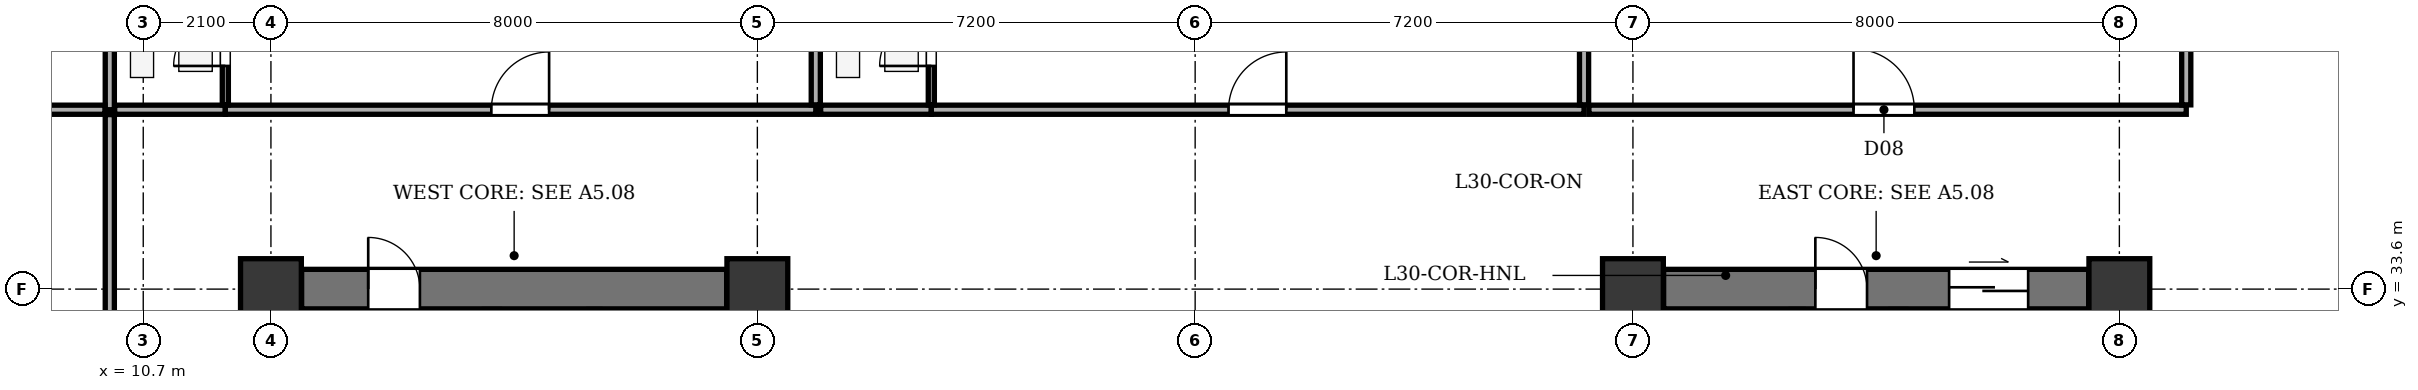
"""IFC4 building model, lengths in metres.
Left out: names, types, materials, properties, quantities, classifications, styles, units other than length and angle.
Written with IfcOpenShell. Run it as: python <this file> out.ifc"""

import sys

from ifc_helpers import new_model, si_unit, direction, frame, frame_2d, origin, origin_2d, place, context, subcontext, project, spatial, rectangle, extrude, element, fill, save


model = new_model("IFC4")
c1 = context("Model", 3, precision=1e-05, world=origin(), true_north=direction((0.0, 1.0)))
c2 = subcontext(c1, "Body", "Model", "MODEL_VIEW")
j1 = project(units=[si_unit("LENGTHUNIT", "METRE"), si_unit("PLANEANGLEUNIT", "RADIAN")], contexts=[c1])
p1 = place(None, origin())
s1 = spatial("IfcSite", under=j1, at=p1, CompositionType="ELEMENT")
p2 = place(p1, origin())
s2 = spatial("IfcBuilding", under=s1, at=p2, CompositionType="ELEMENT")
p3 = place(p2, frame((0.0, 0.0, 123.8)))
s3 = spatial("IfcBuildingStorey", under=s2, at=p3, CompositionType="ELEMENT", Elevation=123.8)
for number, where, z_axis, x_axis in (
    (1, (12.8, 33.6, 0.0), (0.0, 0.0, 1.0), (1.0, 0.0, 0.0)),
    (2, (20.8, 33.6, 0.0), (0.0, 0.0, 1.0), (1.0, 0.0, 0.0)),
    (3, (35.2, 33.6, 0.0), (0.0, 0.0, 1.0), (1.0, 0.0, 0.0)),
    (4, (43.2, 33.6, 0.0), (0.0, 0.0, 1.0), (1.0, 0.0, 0.0)),
):
    element("IfcColumn", number, at=place(p3, frame(where, z_axis=z_axis, x_axis=x_axis)), inside=s3, PredefinedType="COLUMN", context=c2, shape_type="SweptSolid", body=[
        extrude(rectangle(XDim=1.0, YDim=1.0, at=origin_2d()), origin(), (0.0, 0.0, 1.0), 3.5),
    ])
p4 = place(p3, frame((13.305, 33.6, 0.0), z_axis=(0.0, 0.0, 1.0), x_axis=(1.0, 0.0, 0.0)))
e5 = element("IfcWall", 5, at=p4, inside=s3, PredefinedType="SHEAR", context=c2, shape_type="SweptSolid", body=[
    extrude(rectangle(XDim=6.99, YDim=0.65, at=frame_2d((3.495, 0.0))), origin(), (0.0, 0.0, 1.0), 3.2),
])
p5 = place(p4, frame((1.095, 0.0, 0.0)))
e6 = element("IfcOpeningElement", 6, at=p5, cuts=e5, PredefinedType="OPENING", context=c2, shape_type="SweptSolid", body=[
    extrude(rectangle(XDim=0.85, YDim=2.02, at=frame_2d((0.425, 1.01))), frame((0.0, 0.335, 0.0), z_axis=(0.0, -1.0, 0.0), x_axis=(1.0, 0.0, 0.0)), (0.0, 0.0, 1.0), 0.67),
])
p6 = place(p3, frame((16.435, 21.135, 0.0), z_axis=(0.0, 0.0, 1.0), x_axis=(0.0, 1.0, 0.0)))
e7 = element("IfcWall", 7, at=p6, inside=s3, PredefinedType="SHEAR", context=c2, shape_type="SweptSolid", body=[
    extrude(rectangle(XDim=12.13, YDim=0.25, at=frame_2d((6.065, 0.0))), origin(), (0.0, 0.0, 1.0), 3.2),
])
p7 = place(p6, frame((0.515, 0.0, 0.0)))
e8 = element("IfcOpeningElement", 8, at=p7, cuts=e7, PredefinedType="OPENING", context=c2, shape_type="SweptSolid", body=[
    extrude(rectangle(XDim=1.2, YDim=2.15, at=frame_2d((0.6, 1.075))), frame((0.0, 0.135, 0.0), z_axis=(0.0, -1.0, 0.0), x_axis=(1.0, 0.0, 0.0)), (0.0, 0.0, 1.0), 0.27),
])
p8 = place(p6, frame((2.665, 0.0, 0.0)))
e9 = element("IfcOpeningElement", 9, at=p8, cuts=e7, PredefinedType="OPENING", context=c2, shape_type="SweptSolid", body=[
    extrude(rectangle(XDim=1.15, YDim=2.15, at=frame_2d((0.575, 1.075))), frame((0.0, 0.135, 0.0), z_axis=(0.0, -1.0, 0.0), x_axis=(1.0, 0.0, 0.0)), (0.0, 0.0, 1.0), 0.27),
])
p9 = place(p3, frame((18.12, 31.17, 0.0), z_axis=(0.0, 0.0, 1.0), x_axis=(0.0, 1.0, 0.0)))
e10 = element("IfcWall", 10, at=p9, inside=s3, PredefinedType="PARTITIONING", context=c2, shape_type="SweptSolid", body=[
    extrude(rectangle(XDim=2.095, YDim=0.18, at=frame_2d((1.047, 0.0))), origin(), (0.0, 0.0, 1.0), 3.2),
])
p10 = place(p3, frame((35.705, 33.6, 0.0), z_axis=(0.0, 0.0, 1.0), x_axis=(1.0, 0.0, 0.0)))
e11 = element("IfcWall", 11, at=p10, inside=s3, PredefinedType="SHEAR", context=c2, shape_type="SweptSolid", body=[
    extrude(rectangle(XDim=6.99, YDim=0.65, at=frame_2d((3.495, 0.0))), origin(), (0.0, 0.0, 1.0), 3.2),
])
p11 = place(p10, frame((4.695, 0.0, 0.0)))
e12 = element("IfcOpeningElement", 12, at=p11, cuts=e11, PredefinedType="OPENING", context=c2, shape_type="SweptSolid", body=[
    extrude(rectangle(XDim=1.3, YDim=2.15, at=frame_2d((0.65, 1.075))), frame((0.0, 0.335, 0.0), z_axis=(0.0, -1.0, 0.0), x_axis=(1.0, 0.0, 0.0)), (0.0, 0.0, 1.0), 0.67),
])
p12 = place(p10, frame((2.495, 0.0, 0.0)))
e13 = element("IfcOpeningElement", 13, at=p12, cuts=e11, PredefinedType="OPENING", context=c2, shape_type="SweptSolid", body=[
    extrude(rectangle(XDim=0.85, YDim=2.02, at=frame_2d((0.425, 1.01))), frame((0.0, 0.335, 0.0), z_axis=(0.0, -1.0, 0.0), x_axis=(1.0, 0.0, 0.0)), (0.0, 0.0, 1.0), 0.67),
])
p13 = place(p3, frame((39.565, 21.135, 0.0), z_axis=(0.0, 0.0, 1.0), x_axis=(0.0, 1.0, 0.0)))
e14 = element("IfcWall", 14, at=p13, inside=s3, PredefinedType="SHEAR", context=c2, shape_type="SweptSolid", body=[
    extrude(rectangle(XDim=12.13, YDim=0.25, at=frame_2d((6.065, 0.0))), origin(), (0.0, 0.0, 1.0), 3.2),
])
p14 = place(p13, frame((0.515, 0.0, 0.0)))
e15 = element("IfcOpeningElement", 15, at=p14, cuts=e14, PredefinedType="OPENING", context=c2, shape_type="SweptSolid", body=[
    extrude(rectangle(XDim=1.2, YDim=2.15, at=frame_2d((0.6, 1.075))), frame((0.0, 0.135, 0.0), z_axis=(0.0, -1.0, 0.0), x_axis=(1.0, 0.0, 0.0)), (0.0, 0.0, 1.0), 0.27),
])
p15 = place(p13, frame((2.665, 0.0, 0.0)))
e16 = element("IfcOpeningElement", 16, at=p15, cuts=e14, PredefinedType="OPENING", context=c2, shape_type="SweptSolid", body=[
    extrude(rectangle(XDim=1.15, YDim=2.15, at=frame_2d((0.575, 1.075))), frame((0.0, 0.135, 0.0), z_axis=(0.0, -1.0, 0.0), x_axis=(1.0, 0.0, 0.0)), (0.0, 0.0, 1.0), 0.27),
])
p16 = place(p3, frame((37.9, 25.27, 0.0), z_axis=(0.0, 0.0, 1.0), x_axis=(0.0, 1.0, 0.0)))
e17 = element("IfcWall", 17, at=p16, inside=s3, PredefinedType="SOLIDWALL", context=c2, shape_type="SweptSolid", body=[
    extrude(rectangle(XDim=7.995, YDim=0.2, at=frame_2d((3.998, 0.0))), origin(), (0.0, 0.0, 1.0), 3.2),
])
p17 = place(p3, frame((10.15, 36.55, 0.0), z_axis=(0.0, 0.0, 1.0), x_axis=(0.0, 1.0, 0.0)))
e18 = element("IfcWall", 18, at=p17, inside=s3, PredefinedType="PARTITIONING", context=c2, shape_type="SweptSolid", body=[
    extrude(rectangle(XDim=9.575, YDim=0.15, at=frame_2d((4.788, 0.0))), origin(), (0.0, 0.0, 1.0), 3.2),
])
p18 = place(p3, frame((10.23, 36.55, 0.0), z_axis=(0.0, 0.0, 1.0), x_axis=(1.0, 0.0, 0.0)))
e19 = element("IfcWall", 19, at=p18, inside=s3, PredefinedType="PARTITIONING", context=c2, shape_type="SweptSolid", body=[
    extrude(rectangle(XDim=1.82, YDim=0.15, at=frame_2d((0.91, 0.0))), origin(), (0.0, 0.0, 1.0), 3.2),
])
p19 = place(p3, frame((12.05, 36.55, 0.0), z_axis=(0.0, 0.0, 1.0), x_axis=(1.0, 0.0, 0.0)))
e20 = element("IfcWall", 20, at=p19, inside=s3, PredefinedType="PARTITIONING", context=c2, shape_type="SweptSolid", body=[
    extrude(rectangle(XDim=9.711, YDim=0.15, at=frame_2d((4.855, 0.0))), origin(), (0.0, 0.0, 1.0), 3.2),
])
p20 = place(p19, frame((4.375, 0.0, 0.0)))
e21 = element("IfcOpeningElement", 21, at=p20, cuts=e20, PredefinedType="OPENING", context=c2, shape_type="SweptSolid", body=[
    extrude(rectangle(XDim=0.95, YDim=2.1, at=frame_2d((0.475, 1.05))), frame((0.0, 0.085, 0.0), z_axis=(0.0, -1.0, 0.0), x_axis=(1.0, 0.0, 0.0)), (0.0, 0.0, 1.0), 0.17),
])
p21 = place(p3, frame((12.05, 36.63, 0.0), z_axis=(0.0, 0.0, 1.0), x_axis=(0.0, 1.0, 0.0)))
e22 = element("IfcWall", 22, at=p21, inside=s3, PredefinedType="PARTITIONING", context=c2, shape_type="SweptSolid", body=[
    extrude(rectangle(XDim=2.25, YDim=0.1, at=frame_2d((1.125, 0.0))), origin(), (0.0, 0.0, 1.0), 3.2),
])
p22 = place(p21, frame((0.64, 0.0, 0.0)))
e23 = element("IfcOpeningElement", 23, at=p22, cuts=e22, PredefinedType="OPENING", context=c2, shape_type="SweptSolid", body=[
    extrude(rectangle(XDim=0.85, YDim=2.05, at=frame_2d((0.425, 1.025))), frame((0.0, 0.06, 0.0), z_axis=(0.0, -1.0, 0.0), x_axis=(1.0, 0.0, 0.0)), (0.0, 0.0, 1.0), 0.12),
])
p23 = place(p3, frame((21.761, 36.63, 0.0), z_axis=(0.0, 0.0, 1.0), x_axis=(0.0, 1.0, 0.0)))
e24 = element("IfcWall", 24, at=p23, inside=s3, PredefinedType="PARTITIONING", context=c2, shape_type="SweptSolid", body=[
    extrude(rectangle(XDim=9.495, YDim=0.15, at=frame_2d((4.748, 0.0))), origin(), (0.0, 0.0, 1.0), 3.2),
])
p24 = place(p3, frame((21.841, 36.55, 0.0), z_axis=(0.0, 0.0, 1.0), x_axis=(1.0, 0.0, 0.0)))
e25 = element("IfcWall", 25, at=p24, inside=s3, PredefinedType="PARTITIONING", context=c2, shape_type="SweptSolid", body=[
    extrude(rectangle(XDim=1.82, YDim=0.15, at=frame_2d((0.91, 0.0))), origin(), (0.0, 0.0, 1.0), 3.2),
])
p25 = place(p3, frame((23.661, 36.55, 0.0), z_axis=(0.0, 0.0, 1.0), x_axis=(1.0, 0.0, 0.0)))
e26 = element("IfcWall", 26, at=p25, inside=s3, PredefinedType="PARTITIONING", context=c2, shape_type="SweptSolid", body=[
    extrude(rectangle(XDim=10.735, YDim=0.15, at=frame_2d((5.368, 0.0))), origin(), (0.0, 0.0, 1.0), 3.2),
])
p26 = place(p25, frame((4.888, 0.0, 0.0)))
e27 = element("IfcOpeningElement", 27, at=p26, cuts=e26, PredefinedType="OPENING", context=c2, shape_type="SweptSolid", body=[
    extrude(rectangle(XDim=0.95, YDim=2.1, at=frame_2d((0.475, 1.05))), frame((0.0, 0.085, 0.0), z_axis=(0.0, -1.0, 0.0), x_axis=(1.0, 0.0, 0.0)), (0.0, 0.0, 1.0), 0.17),
])
p27 = place(p3, frame((23.661, 36.63, 0.0), z_axis=(0.0, 0.0, 1.0), x_axis=(0.0, 1.0, 0.0)))
e28 = element("IfcWall", 28, at=p27, inside=s3, PredefinedType="PARTITIONING", context=c2, shape_type="SweptSolid", body=[
    extrude(rectangle(XDim=2.25, YDim=0.1, at=frame_2d((1.125, 0.0))), origin(), (0.0, 0.0, 1.0), 3.2),
])
p28 = place(p27, frame((0.64, 0.0, 0.0)))
e29 = element("IfcOpeningElement", 29, at=p28, cuts=e28, PredefinedType="OPENING", context=c2, shape_type="SweptSolid", body=[
    extrude(rectangle(XDim=0.85, YDim=2.05, at=frame_2d((0.425, 1.025))), frame((0.0, 0.06, 0.0), z_axis=(0.0, -1.0, 0.0), x_axis=(1.0, 0.0, 0.0)), (0.0, 0.0, 1.0), 0.12),
])
p29 = place(p3, frame((34.396, 36.63, 0.0), z_axis=(0.0, 0.0, 1.0), x_axis=(0.0, 1.0, 0.0)))
e30 = element("IfcWall", 30, at=p29, inside=s3, PredefinedType="PARTITIONING", context=c2, shape_type="SweptSolid", body=[
    extrude(rectangle(XDim=9.495, YDim=0.15, at=frame_2d((4.748, 0.0))), origin(), (0.0, 0.0, 1.0), 3.2),
])
p30 = place(p3, frame((34.476, 36.55, 0.0), z_axis=(0.0, 0.0, 1.0), x_axis=(1.0, 0.0, 0.0)))
e31 = element("IfcWall", 31, at=p30, inside=s3, PredefinedType="PARTITIONING", context=c2, shape_type="SweptSolid", body=[
    extrude(rectangle(XDim=9.824, YDim=0.15, at=frame_2d((4.912, 0.0))), origin(), (0.0, 0.0, 1.0), 3.2),
])
p31 = place(p30, frame((4.352, 0.0, 0.0)))
e32 = element("IfcOpeningElement", 32, at=p31, cuts=e31, PredefinedType="OPENING", context=c2, shape_type="SweptSolid", body=[
    extrude(rectangle(XDim=1.0, YDim=2.1, at=frame_2d((0.5, 1.05))), frame((0.0, 0.085, 0.0), z_axis=(0.0, -1.0, 0.0), x_axis=(1.0, 0.0, 0.0)), (0.0, 0.0, 1.0), 0.17),
])
p32 = place(p3, frame((44.3, 36.63, 0.0), z_axis=(0.0, 0.0, 1.0), x_axis=(0.0, 1.0, 0.0)))
e33 = element("IfcWall", 33, at=p32, inside=s3, PredefinedType="PARTITIONING", context=c2, shape_type="SweptSolid", body=[
    extrude(rectangle(XDim=9.495, YDim=0.15, at=frame_2d((4.748, 0.0))), origin(), (0.0, 0.0, 1.0), 3.2),
])
p33 = place(p3, frame((4.675, 36.55, 0.0), z_axis=(0.0, 0.0, 1.0), x_axis=(1.0, 0.0, 0.0)))
e34 = element("IfcWall", 34, at=p33, inside=s3, PredefinedType="PARTITIONING", context=c2, shape_type="SweptSolid", body=[
    extrude(rectangle(XDim=5.395, YDim=0.15, at=frame_2d((2.698, 0.0))), origin(), (0.0, 0.0, 1.0), 3.2),
])
p34 = place(p3, frame((10.15, 17.93, 0.0), z_axis=(0.0, 0.0, 1.0), x_axis=(0.0, 1.0, 0.0)))
e35 = element("IfcWall", 35, at=p34, inside=s3, PredefinedType="PARTITIONING", context=c2, shape_type="SweptSolid", body=[
    extrude(rectangle(XDim=18.54, YDim=0.15, at=frame_2d((9.27, 0.0))), origin(), (0.0, 0.0, 1.0), 3.2),
])
p35 = place(p34, frame((8.79, 0.0, 0.0)))
e36 = element("IfcOpeningElement", 36, at=p35, cuts=e35, PredefinedType="OPENING", context=c2, shape_type="SweptSolid", body=[
    extrude(rectangle(XDim=0.95, YDim=2.1, at=frame_2d((0.475, 1.05))), frame((0.0, 0.085, 0.0), z_axis=(0.0, -1.0, 0.0), x_axis=(1.0, 0.0, 0.0)), (0.0, 0.0, 1.0), 0.17),
])
p36 = place(p5, origin())
e37 = element("IfcDoor", 37, at=p36, inside=s3, OperationType="SINGLE_SWING_LEFT", PredefinedType="DOOR", context=c2, shape_type="SweptSolid", body=[
    extrude(rectangle(XDim=0.85, YDim=2.02, at=frame_2d((0.425, 1.01))), frame((0.0, 0.025, 0.0), z_axis=(0.0, -1.0, 0.0), x_axis=(1.0, 0.0, 0.0)), (0.0, 0.0, 1.0), 0.05),
])
fill(e6, e37)
p37 = place(p11, origin())
e38 = element("IfcDoor", 38, at=p37, inside=s3, OperationType="DOUBLE_DOOR_SLIDING", PredefinedType="DOOR", context=c2, shape_type="SweptSolid", body=[
    extrude(rectangle(XDim=1.3, YDim=2.15, at=frame_2d((0.65, 1.075))), frame((0.0, 0.025, 0.0), z_axis=(0.0, -1.0, 0.0), x_axis=(1.0, 0.0, 0.0)), (0.0, 0.0, 1.0), 0.05),
])
fill(e12, e38)
p38 = place(p12, origin())
e39 = element("IfcDoor", 39, at=p38, inside=s3, OperationType="SINGLE_SWING_LEFT", PredefinedType="DOOR", context=c2, shape_type="SweptSolid", body=[
    extrude(rectangle(XDim=0.85, YDim=2.02, at=frame_2d((0.425, 1.01))), frame((0.0, 0.025, 0.0), z_axis=(0.0, -1.0, 0.0), x_axis=(1.0, 0.0, 0.0)), (0.0, 0.0, 1.0), 0.05),
])
fill(e13, e39)
p39 = place(p22, origin())
e40 = element("IfcDoor", 40, at=p39, inside=s3, OperationType="SINGLE_SWING_LEFT", PredefinedType="DOOR", context=c2, shape_type="SweptSolid", body=[
    extrude(rectangle(XDim=0.85, YDim=2.05, at=frame_2d((0.425, 1.025))), frame((0.0, 0.025, 0.0), z_axis=(0.0, -1.0, 0.0), x_axis=(1.0, 0.0, 0.0)), (0.0, 0.0, 1.0), 0.05),
])
fill(e23, e40)
p40 = place(p20, origin())
e41 = element("IfcDoor", 41, at=p40, inside=s3, OperationType="SINGLE_SWING_RIGHT", PredefinedType="DOOR", context=c2, shape_type="SweptSolid", body=[
    extrude(rectangle(XDim=0.95, YDim=2.1, at=frame_2d((0.475, 1.05))), frame((0.0, 0.025, 0.0), z_axis=(0.0, -1.0, 0.0), x_axis=(1.0, 0.0, 0.0)), (0.0, 0.0, 1.0), 0.05),
])
fill(e21, e41)
p41 = place(p28, origin())
e42 = element("IfcDoor", 42, at=p41, inside=s3, OperationType="SINGLE_SWING_LEFT", PredefinedType="DOOR", context=c2, shape_type="SweptSolid", body=[
    extrude(rectangle(XDim=0.85, YDim=2.05, at=frame_2d((0.425, 1.025))), frame((0.0, 0.025, 0.0), z_axis=(0.0, -1.0, 0.0), x_axis=(1.0, 0.0, 0.0)), (0.0, 0.0, 1.0), 0.05),
])
fill(e29, e42)
p42 = place(p26, origin())
e43 = element("IfcDoor", 43, at=p42, inside=s3, OperationType="SINGLE_SWING_RIGHT", PredefinedType="DOOR", context=c2, shape_type="SweptSolid", body=[
    extrude(rectangle(XDim=0.95, YDim=2.1, at=frame_2d((0.475, 1.05))), frame((0.0, 0.025, 0.0), z_axis=(0.0, -1.0, 0.0), x_axis=(1.0, 0.0, 0.0)), (0.0, 0.0, 1.0), 0.05),
])
fill(e27, e43)
p43 = place(p31, origin())
e44 = element("IfcDoor", 44, at=p43, inside=s3, OperationType="SINGLE_SWING_LEFT", PredefinedType="DOOR", context=c2, shape_type="SweptSolid", body=[
    extrude(rectangle(XDim=1.0, YDim=2.1, at=frame_2d((0.5, 1.05))), frame((0.0, 0.025, 0.0), z_axis=(0.0, -1.0, 0.0), x_axis=(1.0, 0.0, 0.0)), (0.0, 0.0, 1.0), 0.05),
])
fill(e32, e44)
save(model, sys.argv[1])
